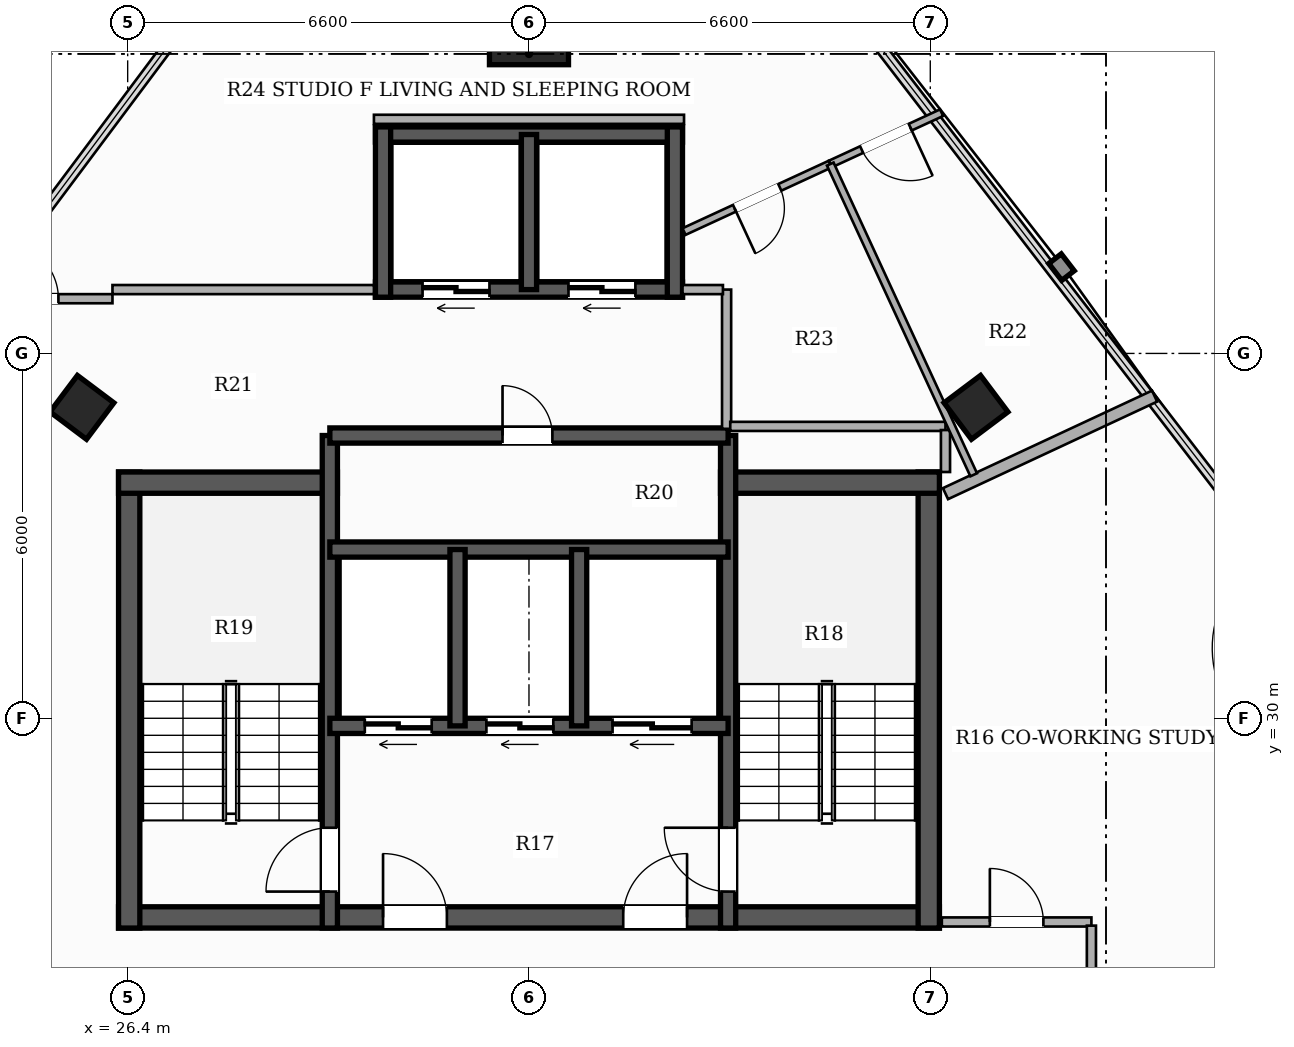
"""IFC4 building model, lengths in metres.
Left out: names, types, materials, properties, quantities, classifications, styles, units other than length and angle.
Written with IfcOpenShell. Run it as: python <this file> out.ifc"""

import sys

from ifc_helpers import new_model, si_unit, direction, frame, frame_2d, origin, origin_2d, place, context, subcontext, project, spatial, rectangle, hollow_rectangle, extrude, element, fill, save


model = new_model("IFC4")
c1 = context("Model", 3, precision=1e-05, world=origin(), true_north=direction((0.0, 1.0)))
c2 = subcontext(c1, "Body", "Model", "MODEL_VIEW")
j1 = project(units=[si_unit("LENGTHUNIT", "METRE"), si_unit("PLANEANGLEUNIT", "RADIAN")], contexts=[c1])
p1 = place(None, origin())
s1 = spatial("IfcSite", under=j1, at=p1, CompositionType="ELEMENT")
p2 = place(p1, origin())
s2 = spatial("IfcBuilding", under=s1, at=p2, CompositionType="ELEMENT")
p3 = place(p2, frame((0.0, 0.0, 199.7)))
s3 = spatial("IfcBuildingStorey", under=s2, at=p3, CompositionType="ELEMENT", Elevation=199.7)
p4 = place(p3, frame((26.25, 26.725, 0.0), z_axis=(0.0, 0.0, 1.0), x_axis=(1.0, 0.0, 0.0)))
e1 = element("IfcWall", 1, at=p4, inside=s3, PredefinedType="SHEAR", context=c2, shape_type="SweptSolid", body=[
    extrude(rectangle(XDim=13.5, YDim=0.35, at=frame_2d((6.75, 0.0))), origin(), (0.0, 0.0, 1.0), 3.3),
])
p5 = place(p4, frame((4.35, 0.0, 0.0)))
e2 = element("IfcOpeningElement", 2, at=p5, cuts=e1, PredefinedType="OPENING", context=c2, shape_type="SweptSolid", body=[
    extrude(rectangle(XDim=1.05, YDim=2.15, at=frame_2d((0.525, 1.075))), frame((0.0, 0.185, 0.0), z_axis=(0.0, -1.0, 0.0), x_axis=(1.0, 0.0, 0.0)), (0.0, 0.0, 1.0), 0.37),
])
p6 = place(p4, frame((8.3, 0.0, 0.0)))
e3 = element("IfcOpeningElement", 3, at=p6, cuts=e1, PredefinedType="OPENING", context=c2, shape_type="SweptSolid", body=[
    extrude(rectangle(XDim=1.05, YDim=2.15, at=frame_2d((0.525, 1.075))), frame((0.0, 0.185, 0.0), z_axis=(0.0, -1.0, 0.0), x_axis=(1.0, 0.0, 0.0)), (0.0, 0.0, 1.0), 0.37),
])
p7 = place(p3, frame((26.425, 26.55, 0.0), z_axis=(0.0, 0.0, 1.0), x_axis=(0.0, 1.0, 0.0)))
e4 = element("IfcWall", 4, at=p7, inside=s3, PredefinedType="SHEAR", context=c2, shape_type="SweptSolid", body=[
    extrude(rectangle(XDim=7.5, YDim=0.35, at=frame_2d((3.75, 0.0))), origin(), (0.0, 0.0, 1.0), 3.3),
])
p8 = place(p3, frame((26.25, 33.875, 0.0), z_axis=(0.0, 0.0, 1.0), x_axis=(1.0, 0.0, 0.0)))
e5 = element("IfcWall", 5, at=p8, inside=s3, PredefinedType="SHEAR", context=c2, shape_type="SweptSolid", body=[
    extrude(rectangle(XDim=3.6, YDim=0.35, at=frame_2d((1.8, 0.0))), origin(), (0.0, 0.0, 1.0), 3.3),
])
p9 = place(p3, frame((39.575, 26.55, 0.0), z_axis=(0.0, 0.0, 1.0), x_axis=(0.0, 1.0, 0.0)))
e6 = element("IfcWall", 6, at=p9, inside=s3, PredefinedType="SHEAR", context=c2, shape_type="SweptSolid", body=[
    extrude(rectangle(XDim=7.5, YDim=0.35, at=frame_2d((3.75, 0.0))), origin(), (0.0, 0.0, 1.0), 3.3),
])
p10 = place(p3, frame((36.15, 33.875, 0.0), z_axis=(0.0, 0.0, 1.0), x_axis=(1.0, 0.0, 0.0)))
e7 = element("IfcWall", 7, at=p10, inside=s3, PredefinedType="SHEAR", context=c2, shape_type="SweptSolid", body=[
    extrude(rectangle(XDim=3.6, YDim=0.35, at=frame_2d((1.8, 0.0))), origin(), (0.0, 0.0, 1.0), 3.3),
])
p11 = place(p3, frame((29.725, 26.55, 0.0), z_axis=(0.0, 0.0, 1.0), x_axis=(0.0, 1.0, 0.0)))
e8 = element("IfcWall", 8, at=p11, inside=s3, PredefinedType="SHEAR", context=c2, shape_type="SweptSolid", body=[
    extrude(rectangle(XDim=8.1, YDim=0.25, at=frame_2d((4.05, 0.0))), origin(), (0.0, 0.0, 1.0), 3.3),
])
p12 = place(p11, frame((0.6, 0.0, 0.0)))
e9 = element("IfcOpeningElement", 9, at=p12, cuts=e8, PredefinedType="OPENING", context=c2, shape_type="SweptSolid", body=[
    extrude(rectangle(XDim=1.05, YDim=2.15, at=frame_2d((0.525, 1.075))), frame((0.0, 0.135, 0.0), z_axis=(0.0, -1.0, 0.0), x_axis=(1.0, 0.0, 0.0)), (0.0, 0.0, 1.0), 0.27),
])
p13 = place(p3, frame((36.275, 26.55, 0.0), z_axis=(0.0, 0.0, 1.0), x_axis=(0.0, 1.0, 0.0)))
e10 = element("IfcWall", 10, at=p13, inside=s3, PredefinedType="SHEAR", context=c2, shape_type="SweptSolid", body=[
    extrude(rectangle(XDim=8.1, YDim=0.25, at=frame_2d((4.05, 0.0))), origin(), (0.0, 0.0, 1.0), 3.3),
])
p14 = place(p13, frame((0.6, 0.0, 0.0)))
e11 = element("IfcOpeningElement", 11, at=p14, cuts=e10, PredefinedType="OPENING", context=c2, shape_type="SweptSolid", body=[
    extrude(rectangle(XDim=1.05, YDim=2.15, at=frame_2d((0.525, 1.075))), frame((0.0, 0.135, 0.0), z_axis=(0.0, -1.0, 0.0), x_axis=(1.0, 0.0, 0.0)), (0.0, 0.0, 1.0), 0.27),
])
p15 = place(p3, frame((36.275, 29.875, 0.0), z_axis=(0.0, 0.0, 1.0), x_axis=(-1.0, 0.0, 0.0)))
e12 = element("IfcWall", 12, at=p15, inside=s3, PredefinedType="SHEAR", context=c2, shape_type="SweptSolid", body=[
    extrude(rectangle(XDim=6.55, YDim=0.25, at=frame_2d((3.275, 0.0))), origin(), (0.0, 0.0, 1.0), 3.3),
])
p16 = place(p15, frame((4.875, 0.0, 0.0)))
e13 = element("IfcOpeningElement", 13, at=p16, cuts=e12, PredefinedType="OPENING", context=c2, shape_type="SweptSolid", body=[
    extrude(rectangle(XDim=1.1, YDim=2.2, at=frame_2d((0.55, 1.1))), frame((0.0, 0.135, 0.0), z_axis=(0.0, -1.0, 0.0), x_axis=(1.0, 0.0, 0.0)), (0.0, 0.0, 1.0), 0.27),
])
p17 = place(p15, frame((2.875, 0.0, 0.0)))
e14 = element("IfcOpeningElement", 14, at=p17, cuts=e12, PredefinedType="OPENING", context=c2, shape_type="SweptSolid", body=[
    extrude(rectangle(XDim=1.1, YDim=2.2, at=frame_2d((0.55, 1.1))), frame((0.0, 0.135, 0.0), z_axis=(0.0, -1.0, 0.0), x_axis=(1.0, 0.0, 0.0)), (0.0, 0.0, 1.0), 0.27),
])
p18 = place(p15, frame((0.6, 0.0, 0.0)))
e15 = element("IfcOpeningElement", 15, at=p18, cuts=e12, PredefinedType="OPENING", context=c2, shape_type="SweptSolid", body=[
    extrude(rectangle(XDim=1.3, YDim=2.2, at=frame_2d((0.65, 1.1))), frame((0.0, 0.135, 0.0), z_axis=(0.0, -1.0, 0.0), x_axis=(1.0, 0.0, 0.0)), (0.0, 0.0, 1.0), 0.27),
])
p19 = place(p3, frame((29.725, 32.775, 0.0), z_axis=(0.0, 0.0, 1.0), x_axis=(1.0, 0.0, 0.0)))
e16 = element("IfcWall", 16, at=p19, inside=s3, PredefinedType="SHEAR", context=c2, shape_type="SweptSolid", body=[
    extrude(rectangle(XDim=6.55, YDim=0.25, at=frame_2d((3.275, 0.0))), origin(), (0.0, 0.0, 1.0), 3.3),
])
for number, where, z_axis, x_axis in (
    (17, (31.825, 29.875, 0.0), (0.0, 0.0, 1.0), (0.0, 1.0, 0.0)),
    (18, (33.825, 29.875, 0.0), (0.0, 0.0, 1.0), (0.0, 1.0, 0.0)),
):
    element("IfcWall", number, at=place(p3, frame(where, z_axis=z_axis, x_axis=x_axis)), inside=s3, PredefinedType="SHEAR", context=c2, shape_type="SweptSolid", body=[
        extrude(rectangle(XDim=2.9, YDim=0.25, at=frame_2d((1.45, 0.0))), origin(), (0.0, 0.0, 1.0), 3.3),
    ])
p20 = place(p3, frame((29.725, 34.65, 0.0), z_axis=(0.0, 0.0, 1.0), x_axis=(1.0, 0.0, 0.0)))
e19 = element("IfcWall", 19, at=p20, inside=s3, PredefinedType="SHEAR", context=c2, shape_type="SweptSolid", body=[
    extrude(rectangle(XDim=6.55, YDim=0.25, at=frame_2d((3.275, 0.0))), origin(), (0.0, 0.0, 1.0), 3.3),
])
p21 = place(p20, frame((2.84, 0.0, 0.0)))
e20 = element("IfcOpeningElement", 20, at=p21, cuts=e19, PredefinedType="OPENING", context=c2, shape_type="SweptSolid", body=[
    extrude(rectangle(XDim=0.82, YDim=2.1, at=frame_2d((0.41, 1.05))), frame((0.0, 0.135, 0.0), z_axis=(0.0, -1.0, 0.0), x_axis=(1.0, 0.0, 0.0)), (0.0, 0.0, 1.0), 0.27),
])
p22 = place(p3, frame((35.525, 37.05, 0.0), z_axis=(0.0, 0.0, 1.0), x_axis=(-1.0, 0.0, 0.0)))
e21 = element("IfcWall", 21, at=p22, inside=s3, PredefinedType="SHEAR", context=c2, shape_type="SweptSolid", body=[
    extrude(rectangle(XDim=5.05, YDim=0.25, at=frame_2d((2.525, 0.0))), origin(), (0.0, 0.0, 1.0), 3.3),
])
p23 = place(p22, frame((3.175, 0.0, 0.0)))
e22 = element("IfcOpeningElement", 22, at=p23, cuts=e21, PredefinedType="OPENING", context=c2, shape_type="SweptSolid", body=[
    extrude(rectangle(XDim=1.1, YDim=2.2, at=frame_2d((0.55, 1.1))), frame((0.0, 0.135, 0.0), z_axis=(0.0, -1.0, 0.0), x_axis=(1.0, 0.0, 0.0)), (0.0, 0.0, 1.0), 0.27),
])
p24 = place(p22, frame((0.775, 0.0, 0.0)))
e23 = element("IfcOpeningElement", 23, at=p24, cuts=e21, PredefinedType="OPENING", context=c2, shape_type="SweptSolid", body=[
    extrude(rectangle(XDim=1.1, YDim=2.2, at=frame_2d((0.55, 1.1))), frame((0.0, 0.135, 0.0), z_axis=(0.0, -1.0, 0.0), x_axis=(1.0, 0.0, 0.0)), (0.0, 0.0, 1.0), 0.27),
])
p25 = place(p3, frame((30.475, 39.6, 0.0), z_axis=(0.0, 0.0, 1.0), x_axis=(1.0, 0.0, 0.0)))
e24 = element("IfcWall", 24, at=p25, inside=s3, PredefinedType="SHEAR", context=c2, shape_type="SweptSolid", body=[
    extrude(rectangle(XDim=5.05, YDim=0.25, at=frame_2d((2.525, 0.0))), origin(), (0.0, 0.0, 1.0), 3.3),
])
for number, where, z_axis, x_axis in (
    (25, (30.6, 36.925, 0.0), (0.0, 0.0, 1.0), (0.0, 1.0, 0.0)),
    (26, (35.4, 36.925, 0.0), (0.0, 0.0, 1.0), (0.0, 1.0, 0.0)),
):
    element("IfcWall", number, at=place(p3, frame(where, z_axis=z_axis, x_axis=x_axis)), inside=s3, PredefinedType="SHEAR", context=c2, shape_type="SweptSolid", body=[
        extrude(rectangle(XDim=2.8, YDim=0.25, at=frame_2d((1.4, 0.0))), origin(), (0.0, 0.0, 1.0), 3.3),
    ])
p26 = place(p3, frame((33.0, 37.05, 0.0), z_axis=(0.0, 0.0, 1.0), x_axis=(0.0, 1.0, 0.0)))
e27 = element("IfcWall", 27, at=p26, inside=s3, PredefinedType="SHEAR", context=c2, shape_type="SweptSolid", body=[
    extrude(rectangle(XDim=2.55, YDim=0.25, at=frame_2d((1.275, 0.0))), origin(), (0.0, 0.0, 1.0), 3.3),
])
p27 = place(p3, frame((33.0, 41.398, 0.0), z_axis=(0.0, 0.0, 1.0), x_axis=(1.0, 0.0, 0.0)))
e28 = element("IfcColumn", 28, at=p27, inside=s3, PredefinedType="COLUMN", context=c2, shape_type="SweptSolid", body=[
    extrude(hollow_rectangle(XDim=1.3, YDim=1.3, WallThickness=0.04, at=origin_2d()), origin(), (0.0, 0.0, 1.0), 3.3),
])
for number, where, z_axis, x_axis in (
    (29, (25.648, 35.113, 0.0), (0.0, 0.0, 1.0), (0.6, 0.8, 0.0)),
    (30, (40.352, 35.113, 0.0), (0.0, 0.0, 1.0), (-0.6, 0.8, 0.0)),
):
    element("IfcColumn", number, at=place(p3, frame(where, z_axis=z_axis, x_axis=x_axis)), inside=s3, PredefinedType="COLUMN", context=c2, shape_type="SweptSolid", body=[
        extrude(hollow_rectangle(XDim=0.75, YDim=0.75, WallThickness=0.025, at=origin_2d()), origin(), (0.0, 0.0, 1.0), 3.3),
    ])
p28 = place(p3, frame((36.25, 34.76, 0.0), z_axis=(0.0, 0.0, 1.0), x_axis=(0.0, 1.0, 0.0)))
e31 = element("IfcWall", 31, at=p28, inside=s3, PredefinedType="PARTITIONING", context=c2, shape_type="SweptSolid", body=[
    extrude(rectangle(XDim=2.29, YDim=0.15, at=frame_2d((1.145, 0.0))), origin(), (0.0, 0.0, 1.0), 2.425),
])
p29 = place(p3, frame((35.525, 37.05, 0.0), z_axis=(0.0, 0.0, 1.0), x_axis=(1.0, 0.0, 0.0)))
e32 = element("IfcWall", 32, at=p29, inside=s3, PredefinedType="PARTITIONING", context=c2, shape_type="SweptSolid", body=[
    extrude(rectangle(XDim=0.665, YDim=0.15, at=frame_2d((0.333, 0.0))), origin(), (0.0, 0.0, 1.0), 2.425),
])
p30 = place(p3, frame((23.831, 36.9, 0.0), z_axis=(0.0, 0.0, 1.0), x_axis=(1.0, 0.0, 0.0)))
e33 = element("IfcWall", 33, at=p30, inside=s3, PredefinedType="PARTITIONING", context=c2, shape_type="SweptSolid", body=[
    extrude(rectangle(XDim=2.319, YDim=0.15, at=frame_2d((1.159, 0.0))), origin(), (0.0, 0.0, 1.0), 2.619),
])
p31 = place(p30, frame((0.51, 0.0, 0.0)))
e34 = element("IfcOpeningElement", 34, at=p31, cuts=e33, PredefinedType="OPENING", context=c2, shape_type="SweptSolid", body=[
    extrude(rectangle(XDim=0.92, YDim=2.15, at=frame_2d((0.46, 1.075))), frame((0.0, 0.085, 0.0), z_axis=(0.0, -1.0, 0.0), x_axis=(1.0, 0.0, 0.0)), (0.0, 0.0, 1.0), 0.17),
])
p32 = place(p3, frame((39.79, 26.65, 0.0), z_axis=(0.0, 0.0, 1.0), x_axis=(1.0, 0.0, 0.0)))
e35 = element("IfcWall", 35, at=p32, inside=s3, PredefinedType="PARTITIONING", context=c2, shape_type="SweptSolid", body=[
    extrude(rectangle(XDim=2.46, YDim=0.15, at=frame_2d((1.23, 0.0))), origin(), (0.0, 0.0, 1.0), 2.565),
])
p33 = place(p32, frame((0.79, 0.0, 0.0)))
e36 = element("IfcOpeningElement", 36, at=p33, cuts=e35, PredefinedType="OPENING", context=c2, shape_type="SweptSolid", body=[
    extrude(rectangle(XDim=0.88, YDim=2.1, at=frame_2d((0.44, 1.05))), frame((0.0, 0.085, 0.0), z_axis=(0.0, -1.0, 0.0), x_axis=(1.0, 0.0, 0.0)), (0.0, 0.0, 1.0), 0.17),
])
p34 = place(p3, frame((42.25, 26.59, 0.0), z_axis=(0.0, 0.0, 1.0), x_axis=(0.0, -1.0, 0.0)))
e37 = element("IfcWall", 37, at=p34, inside=s3, PredefinedType="PARTITIONING", context=c2, shape_type="SweptSolid", body=[
    extrude(rectangle(XDim=2.74, YDim=0.15, at=frame_2d((1.37, 0.0))), origin(), (0.0, 0.0, 1.0), 2.773),
])
p35 = place(p3, frame((26.15, 37.05, 0.0), z_axis=(0.0, 0.0, 1.0), x_axis=(1.0, 0.0, 0.0)))
e38 = element("IfcWall", 38, at=p35, inside=s3, PredefinedType="PARTITIONING", context=c2, shape_type="SweptSolid", body=[
    extrude(rectangle(XDim=4.3, YDim=0.15, at=frame_2d((2.15, 0.0))), origin(), (0.0, 0.0, 1.0), 2.425),
])
p36 = place(p3, frame((30.45, 39.85, 0.0), z_axis=(0.0, 0.0, 1.0), x_axis=(1.0, 0.0, 0.0)))
e39 = element("IfcWall", 39, at=p36, inside=s3, PredefinedType="PARTITIONING", context=c2, shape_type="SweptSolid", body=[
    extrude(rectangle(XDim=5.1, YDim=0.15, at=frame_2d((2.55, 0.0))), origin(), (0.0, 0.0, 1.0), 2.492),
])
p37 = place(p3, frame((36.31, 34.8, 0.0), z_axis=(0.0, 0.0, 1.0), x_axis=(1.0, 0.0, 0.0)))
e40 = element("IfcWall", 40, at=p37, inside=s3, PredefinedType="PARTITIONING", context=c2, shape_type="SweptSolid", body=[
    extrude(rectangle(XDim=3.54, YDim=0.15, at=frame_2d((1.77, 0.0))), origin(), (0.0, 0.0, 1.0), 2.425),
])
p38 = place(p3, frame((39.85, 34.74, 0.0), z_axis=(0.0, 0.0, 1.0), x_axis=(0.0, -1.0, 0.0)))
e41 = element("IfcWall", 41, at=p38, inside=s3, PredefinedType="PARTITIONING", context=c2, shape_type="SweptSolid", body=[
    extrude(rectangle(XDim=0.69, YDim=0.15, at=frame_2d((0.345, 0.0))), origin(), (0.0, 0.0, 1.0), 2.773),
])
p39 = place(p3, frame((43.289, 35.298, 0.0), z_axis=(0.0, 0.0, 1.0), x_axis=(-0.906268592738, -0.422702304011, 0.0)))
e42 = element("IfcWall", 42, at=p39, inside=s3, PredefinedType="PARTITIONING", context=c2, shape_type="SweptSolid", body=[
    extrude(rectangle(XDim=3.795, YDim=0.2, at=frame_2d((1.897, 0.0))), origin(), (0.0, 0.0, 1.0), 2.492),
])
p40 = place(p3, frame((37.955, 39.114, 0.0), z_axis=(0.0, 0.0, 1.0), x_axis=(-0.907945896046, -0.41908740121, 0.0)))
e43 = element("IfcWall", 43, at=p40, inside=s3, PredefinedType="PARTITIONING", context=c2, shape_type="SweptSolid", body=[
    extrude(rectangle(XDim=2.649, YDim=0.12, at=frame_2d((1.324, 0.0))), origin(), (0.0, 0.0, 1.0), 2.492),
])
p41 = place(p40, frame((0.914, 0.0, 0.0)))
e44 = element("IfcOpeningElement", 44, at=p41, cuts=e43, PredefinedType="OPENING", context=c2, shape_type="SweptSolid", body=[
    extrude(rectangle(XDim=0.82, YDim=2.1, at=frame_2d((0.41, 1.05))), frame((0.0, 0.07, 0.0), z_axis=(0.0, -1.0, 0.0), x_axis=(1.0, 0.0, 0.0)), (0.0, 0.0, 1.0), 0.14),
])
p42 = place(p3, frame((39.786, 39.959, 0.0), z_axis=(0.0, 0.0, 1.0), x_axis=(-0.90796292821, -0.419050499338, 0.0)))
e45 = element("IfcWall", 45, at=p42, inside=s3, PredefinedType="PARTITIONING", context=c2, shape_type="SweptSolid", body=[
    extrude(rectangle(XDim=2.016, YDim=0.12, at=frame_2d((1.008, 0.0))), origin(), (0.0, 0.0, 1.0), 3.06),
])
p43 = place(p42, frame((0.568, 0.0, 0.0)))
e46 = element("IfcOpeningElement", 46, at=p43, cuts=e45, PredefinedType="OPENING", context=c2, shape_type="SweptSolid", body=[
    extrude(rectangle(XDim=0.88, YDim=2.1, at=frame_2d((0.44, 1.05))), frame((0.0, 0.07, 0.0), z_axis=(0.0, -1.0, 0.0), x_axis=(1.0, 0.0, 0.0)), (0.0, 0.0, 1.0), 0.14),
])
p44 = place(p3, frame((37.955, 39.114, 0.0), z_axis=(0.0, 0.0, 1.0), x_axis=(0.41911319203, -0.907933991139, 0.0)))
e47 = element("IfcWall", 47, at=p44, inside=s3, PredefinedType="PARTITIONING", context=c2, shape_type="SweptSolid", body=[
    extrude(rectangle(XDim=5.628, YDim=0.12, at=frame_2d((2.814, 0.0))), origin(), (0.0, 0.0, 1.0), 2.492),
])
p45 = place(p12, origin())
e48 = element("IfcDoor", 48, at=p45, inside=s3, OperationType="SINGLE_SWING_LEFT", PredefinedType="DOOR", context=c2, shape_type="SweptSolid", body=[
    extrude(rectangle(XDim=1.05, YDim=2.15, at=frame_2d((0.525, 1.075))), frame((0.0, 0.025, 0.0), z_axis=(0.0, -1.0, 0.0), x_axis=(1.0, 0.0, 0.0)), (0.0, 0.0, 1.0), 0.05),
])
fill(e9, e48)
p46 = place(p14, origin())
e49 = element("IfcDoor", 49, at=p46, inside=s3, OperationType="SINGLE_SWING_RIGHT", PredefinedType="DOOR", context=c2, shape_type="SweptSolid", body=[
    extrude(rectangle(XDim=1.05, YDim=2.15, at=frame_2d((0.525, 1.075))), frame((0.0, 0.025, 0.0), z_axis=(0.0, -1.0, 0.0), x_axis=(1.0, 0.0, 0.0)), (0.0, 0.0, 1.0), 0.05),
])
fill(e11, e49)
p47 = place(p5, origin())
e50 = element("IfcDoor", 50, at=p47, inside=s3, OperationType="SINGLE_SWING_LEFT", PredefinedType="DOOR", context=c2, shape_type="SweptSolid", body=[
    extrude(rectangle(XDim=1.05, YDim=2.15, at=frame_2d((0.525, 1.075))), frame((0.0, 0.025, 0.0), z_axis=(0.0, -1.0, 0.0), x_axis=(1.0, 0.0, 0.0)), (0.0, 0.0, 1.0), 0.05),
])
fill(e2, e50)
p48 = place(p6, origin())
e51 = element("IfcDoor", 51, at=p48, inside=s3, OperationType="SINGLE_SWING_RIGHT", PredefinedType="DOOR", context=c2, shape_type="SweptSolid", body=[
    extrude(rectangle(XDim=1.05, YDim=2.15, at=frame_2d((0.525, 1.075))), frame((0.0, 0.025, 0.0), z_axis=(0.0, -1.0, 0.0), x_axis=(1.0, 0.0, 0.0)), (0.0, 0.0, 1.0), 0.05),
])
fill(e3, e51)
p49 = place(p16, origin())
e52 = element("IfcDoor", 52, at=p49, inside=s3, OperationType="DOUBLE_DOOR_SLIDING", PredefinedType="DOOR", context=c2, shape_type="SweptSolid", body=[
    extrude(rectangle(XDim=1.1, YDim=2.2, at=frame_2d((0.55, 1.1))), frame((0.0, 0.025, 0.0), z_axis=(0.0, -1.0, 0.0), x_axis=(1.0, 0.0, 0.0)), (0.0, 0.0, 1.0), 0.05),
])
fill(e13, e52)
p50 = place(p17, origin())
e53 = element("IfcDoor", 53, at=p50, inside=s3, OperationType="DOUBLE_DOOR_SLIDING", PredefinedType="DOOR", context=c2, shape_type="SweptSolid", body=[
    extrude(rectangle(XDim=1.1, YDim=2.2, at=frame_2d((0.55, 1.1))), frame((0.0, 0.025, 0.0), z_axis=(0.0, -1.0, 0.0), x_axis=(1.0, 0.0, 0.0)), (0.0, 0.0, 1.0), 0.05),
])
fill(e14, e53)
p51 = place(p18, origin())
e54 = element("IfcDoor", 54, at=p51, inside=s3, OperationType="DOUBLE_DOOR_SLIDING", PredefinedType="DOOR", context=c2, shape_type="SweptSolid", body=[
    extrude(rectangle(XDim=1.3, YDim=2.2, at=frame_2d((0.65, 1.1))), frame((0.0, 0.025, 0.0), z_axis=(0.0, -1.0, 0.0), x_axis=(1.0, 0.0, 0.0)), (0.0, 0.0, 1.0), 0.05),
])
fill(e15, e54)
p52 = place(p23, origin())
e55 = element("IfcDoor", 55, at=p52, inside=s3, OperationType="DOUBLE_DOOR_SLIDING", PredefinedType="DOOR", context=c2, shape_type="SweptSolid", body=[
    extrude(rectangle(XDim=1.1, YDim=2.2, at=frame_2d((0.55, 1.1))), frame((0.0, 0.025, 0.0), z_axis=(0.0, -1.0, 0.0), x_axis=(1.0, 0.0, 0.0)), (0.0, 0.0, 1.0), 0.05),
])
fill(e22, e55)
p53 = place(p24, origin())
e56 = element("IfcDoor", 56, at=p53, inside=s3, OperationType="DOUBLE_DOOR_SLIDING", PredefinedType="DOOR", context=c2, shape_type="SweptSolid", body=[
    extrude(rectangle(XDim=1.1, YDim=2.2, at=frame_2d((0.55, 1.1))), frame((0.0, 0.025, 0.0), z_axis=(0.0, -1.0, 0.0), x_axis=(1.0, 0.0, 0.0)), (0.0, 0.0, 1.0), 0.05),
])
fill(e23, e56)
p54 = place(p21, origin())
e57 = element("IfcDoor", 57, at=p54, inside=s3, OperationType="SINGLE_SWING_LEFT", PredefinedType="DOOR", context=c2, shape_type="SweptSolid", body=[
    extrude(rectangle(XDim=0.82, YDim=2.1, at=frame_2d((0.41, 1.05))), frame((0.0, 0.025, 0.0), z_axis=(0.0, -1.0, 0.0), x_axis=(1.0, 0.0, 0.0)), (0.0, 0.0, 1.0), 0.05),
])
fill(e20, e57)
p55 = place(p31, origin())
e58 = element("IfcDoor", 58, at=p55, inside=s3, OperationType="SINGLE_SWING_LEFT", PredefinedType="DOOR", context=c2, shape_type="SweptSolid", body=[
    extrude(rectangle(XDim=0.92, YDim=2.15, at=frame_2d((0.46, 1.075))), frame((0.0, 0.025, 0.0), z_axis=(0.0, -1.0, 0.0), x_axis=(1.0, 0.0, 0.0)), (0.0, 0.0, 1.0), 0.05),
])
fill(e34, e58)
p56 = place(p41, origin())
e59 = element("IfcDoor", 59, at=p56, inside=s3, OperationType="SINGLE_SWING_RIGHT", PredefinedType="DOOR", context=c2, shape_type="SweptSolid", body=[
    extrude(rectangle(XDim=0.82, YDim=2.1, at=frame_2d((0.41, 1.05))), frame((0.0, 0.025, 0.0), z_axis=(0.0, -1.0, 0.0), x_axis=(1.0, 0.0, 0.0)), (0.0, 0.0, 1.0), 0.05),
])
fill(e44, e59)
p57 = place(p43, origin())
e60 = element("IfcDoor", 60, at=p57, inside=s3, OperationType="SINGLE_SWING_LEFT", PredefinedType="DOOR", context=c2, shape_type="SweptSolid", body=[
    extrude(rectangle(XDim=0.88, YDim=2.1, at=frame_2d((0.44, 1.05))), frame((0.0, 0.025, 0.0), z_axis=(0.0, -1.0, 0.0), x_axis=(1.0, 0.0, 0.0)), (0.0, 0.0, 1.0), 0.05),
])
fill(e46, e60)
p58 = place(p33, origin())
e61 = element("IfcDoor", 61, at=p58, inside=s3, OperationType="SINGLE_SWING_LEFT", PredefinedType="DOOR", context=c2, shape_type="SweptSolid", body=[
    extrude(rectangle(XDim=0.88, YDim=2.1, at=frame_2d((0.44, 1.05))), frame((0.0, 0.025, 0.0), z_axis=(0.0, -1.0, 0.0), x_axis=(1.0, 0.0, 0.0)), (0.0, 0.0, 1.0), 0.05),
])
fill(e36, e61)
save(model, sys.argv[1])
